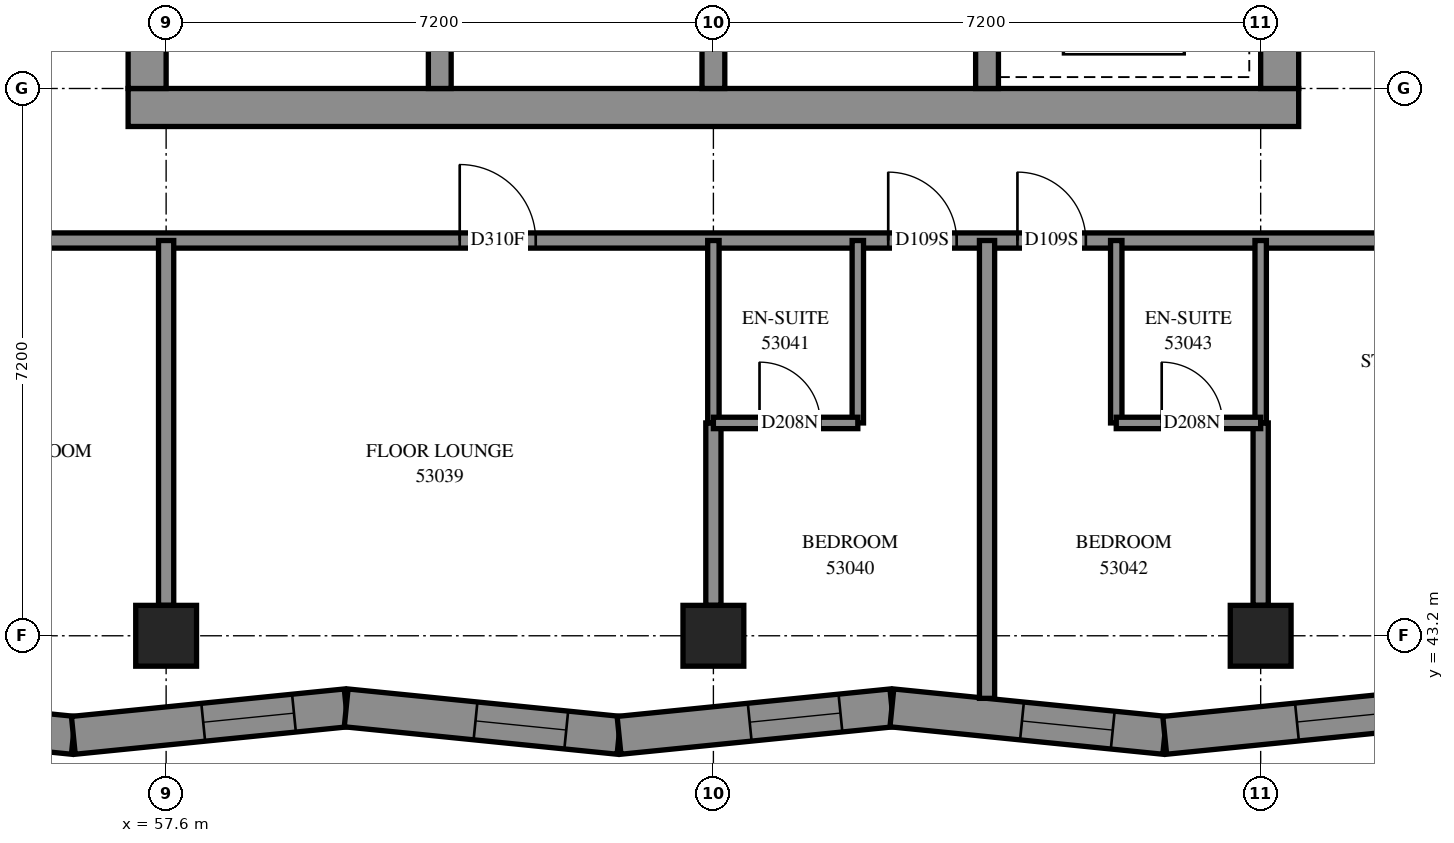
"""IFC4 building model, lengths in metres.
Left out: names, types, materials, properties, quantities, classifications, styles, units other than length and angle.
Written with IfcOpenShell. Run it as: python <this file> out.ifc"""

import sys

from ifc_helpers import new_model, si_unit, direction, frame, frame_2d, origin, origin_2d, place, context, subcontext, project, spatial, polyline, rectangle, outline, extrude, element, fill, save


model = new_model("IFC4")
c1 = context("Model", 3, precision=1e-05, world=origin(), true_north=direction((0.0, 1.0)))
c2 = subcontext(c1, "Body", "Model", "MODEL_VIEW")
j1 = project(units=[si_unit("LENGTHUNIT", "METRE"), si_unit("PLANEANGLEUNIT", "RADIAN")], contexts=[c1])
p1 = place(None, origin())
s1 = spatial("IfcSite", under=j1, at=p1, CompositionType="ELEMENT")
p2 = place(p1, origin())
s2 = spatial("IfcBuilding", under=s1, at=p2, CompositionType="ELEMENT")
p3 = place(p2, frame((0.0, 0.0, 196.4)))
s3 = spatial("IfcBuildingStorey", under=s2, at=p3, CompositionType="ELEMENT", Elevation=196.4)
for number, where, z_axis, x_axis in (
    (1, (57.6, 43.2, 0.0), (0.0, 0.0, 1.0), (1.0, 0.0, 0.0)),
    (2, (64.8, 43.2, 0.0), (0.0, 0.0, 1.0), (1.0, 0.0, 0.0)),
    (3, (72.0, 43.2, 0.0), (0.0, 0.0, 1.0), (1.0, 0.0, 0.0)),
):
    element("IfcColumn", number, at=place(p3, frame(where, z_axis=z_axis, x_axis=x_axis)), inside=s3, PredefinedType="COLUMN", context=c2, shape_type="SweptSolid", body=[
        extrude(rectangle(XDim=0.8, YDim=0.8, at=origin_2d()), origin(), (0.0, 0.0, 1.0), 3.1),
    ])
p4 = place(p3, frame((57.1, 50.15, -0.3), z_axis=(0.0, 0.0, 1.0), x_axis=(1.0, 0.0, 0.0)))
e4 = element("IfcWall", 4, at=p4, inside=s3, PredefinedType="SHEAR", context=c2, shape_type="SweptSolid", body=[
    extrude(rectangle(XDim=15.4, YDim=0.5, at=frame_2d((7.7, 0.0))), origin(), (0.0, 0.0, 1.0), 2.7),
])
p5 = place(p3, frame((57.35, 50.4, -0.3), z_axis=(0.0, 0.0, 1.0), x_axis=(0.0, 1.0, 0.0)))
e5 = element("IfcWall", 5, at=p5, inside=s3, PredefinedType="SHEAR", context=c2, shape_type="SweptSolid", body=[
    extrude(rectangle(XDim=14.4, YDim=0.5, at=frame_2d((7.2, 0.0))), origin(), (0.0, 0.0, 1.0), 2.7),
])
p6 = place(p5, frame((4.55, 0.0, 0.3)))
e6 = element("IfcOpeningElement", 6, at=p6, cuts=e5, PredefinedType="OPENING", context=c2, shape_type="SweptSolid", body=[
    extrude(rectangle(XDim=1.1, YDim=2.1, at=frame_2d((0.55, 1.05))), frame((0.0, 0.26, 0.0), z_axis=(0.0, -1.0, 0.0), x_axis=(1.0, 0.0, 0.0)), (0.0, 0.0, 1.0), 0.52),
])
p7 = place(p5, frame((11.35, 0.0, 0.3)))
e7 = element("IfcOpeningElement", 7, at=p7, cuts=e5, PredefinedType="OPENING", context=c2, shape_type="SweptSolid", body=[
    extrude(rectangle(XDim=1.1, YDim=2.1, at=frame_2d((0.55, 1.05))), frame((0.0, 0.26, 0.0), z_axis=(0.0, -1.0, 0.0), x_axis=(1.0, 0.0, 0.0)), (0.0, 0.0, 1.0), 0.52),
])
p8 = place(p3, frame((72.25, 50.4, -0.3), z_axis=(0.0, 0.0, 1.0), x_axis=(0.0, 1.0, 0.0)))
e8 = element("IfcWall", 8, at=p8, inside=s3, PredefinedType="SHEAR", context=c2, shape_type="SweptSolid", body=[
    extrude(rectangle(XDim=14.4, YDim=0.5, at=frame_2d((7.2, 0.0))), origin(), (0.0, 0.0, 1.0), 2.7),
])
p9 = place(p8, frame((4.55, 0.0, 0.3)))
e9 = element("IfcOpeningElement", 9, at=p9, cuts=e8, PredefinedType="OPENING", context=c2, shape_type="SweptSolid", body=[
    extrude(rectangle(XDim=1.1, YDim=2.1, at=frame_2d((0.55, 1.05))), frame((0.0, 0.26, 0.0), z_axis=(0.0, -1.0, 0.0), x_axis=(1.0, 0.0, 0.0)), (0.0, 0.0, 1.0), 0.52),
])
p10 = place(p8, frame((11.35, 0.0, 0.3)))
e10 = element("IfcOpeningElement", 10, at=p10, cuts=e8, PredefinedType="OPENING", context=c2, shape_type="SweptSolid", body=[
    extrude(rectangle(XDim=1.1, YDim=2.1, at=frame_2d((0.55, 1.05))), frame((0.0, 0.26, 0.0), z_axis=(0.0, -1.0, 0.0), x_axis=(1.0, 0.0, 0.0)), (0.0, 0.0, 1.0), 0.52),
])
for number, where, z_axis, x_axis in (
    (11, (61.2, 50.4, 0.0), (0.0, 0.0, 1.0), (0.0, 1.0, 0.0)),
    (12, (64.8, 50.4, 0.0), (0.0, 0.0, 1.0), (0.0, 1.0, 0.0)),
    (13, (68.4, 50.4, 0.0), (0.0, 0.0, 1.0), (0.0, 1.0, 0.0)),
):
    element("IfcWall", number, at=place(p3, frame(where, z_axis=z_axis, x_axis=x_axis)), inside=s3, PredefinedType="SOLIDWALL", context=c2, shape_type="SweptSolid", body=[
        extrude(rectangle(XDim=3.3, YDim=0.3, at=frame_2d((1.65, 0.0))), origin(), (0.0, 0.0, 1.0), 3.1),
    ])
p11 = place(p3, frame((52.769, 42.253, 0.0), z_axis=(0.0, 0.0, 1.0), x_axis=(0.9949827385, -0.1000467394, 0.0)))
e14 = element("IfcWall", 14, at=p11, inside=s3, PredefinedType="SOLIDWALL", context=c2, shape_type="SweptSolid", body=[
    extrude(outline(polyline([(0.046, -0.25), (3.653, -0.25), (3.603, 0.25), (-0.046, 0.25), (0.046, -0.25)])), origin(), (0.0, 0.0, 1.0), 3.1),
])
p12 = place(p11, frame((1.72, 0.0, 0.45)))
e15 = element("IfcOpeningElement", 15, at=p12, cuts=e14, PredefinedType="OPENING", context=c2, shape_type="SweptSolid", body=[
    extrude(rectangle(XDim=1.2, YDim=2.5, at=frame_2d((0.6, 1.25))), frame((0.0, 0.26, 0.0), z_axis=(0.0, -1.0, 0.0), x_axis=(1.0, 0.0, 0.0)), (0.0, 0.0, 1.0), 0.52),
])
p13 = place(p3, frame((56.379, 41.89, 0.0), z_axis=(0.0, 0.0, 1.0), x_axis=(0.994981047, 0.1000635608, 0.0)))
e16 = element("IfcWall", 16, at=p13, inside=s3, PredefinedType="SOLIDWALL", context=c2, shape_type="SweptSolid", body=[
    extrude(outline(polyline([(-0.025, -0.25), (3.583, -0.25), (3.633, 0.25), (0.025, 0.25), (-0.025, -0.25)])), origin(), (0.0, 0.0, 1.0), 3.1),
])
p14 = place(p13, frame((1.717, 0.0, 0.45)))
e17 = element("IfcOpeningElement", 17, at=p14, cuts=e16, PredefinedType="OPENING", context=c2, shape_type="SweptSolid", body=[
    extrude(rectangle(XDim=1.2, YDim=2.5, at=frame_2d((0.6, 1.25))), frame((0.0, 0.26, 0.0), z_axis=(0.0, -1.0, 0.0), x_axis=(1.0, 0.0, 0.0)), (0.0, 0.0, 1.0), 0.52),
])
p15 = place(p3, frame((59.969, 42.251, 0.0), z_axis=(0.0, 0.0, 1.0), x_axis=(0.9949813245, -0.1000608012, 0.0)))
e18 = element("IfcWall", 18, at=p15, inside=s3, PredefinedType="SOLIDWALL", context=c2, shape_type="SweptSolid", body=[
    extrude(outline(polyline([(0.025, -0.25), (3.633, -0.25), (3.583, 0.25), (-0.025, 0.25), (0.025, -0.25)])), origin(), (0.0, 0.0, 1.0), 3.1),
])
p16 = place(p15, frame((1.71, 0.0, 0.45)))
e19 = element("IfcOpeningElement", 19, at=p16, cuts=e18, PredefinedType="OPENING", context=c2, shape_type="SweptSolid", body=[
    extrude(rectangle(XDim=1.2, YDim=2.5, at=frame_2d((0.6, 1.25))), frame((0.0, 0.26, 0.0), z_axis=(0.0, -1.0, 0.0), x_axis=(1.0, 0.0, 0.0)), (0.0, 0.0, 1.0), 0.52),
])
p17 = place(p3, frame((63.559, 41.89, 0.0), z_axis=(0.0, 0.0, 1.0), x_axis=(0.994981047, 0.1000635608, 0.0)))
e20 = element("IfcWall", 20, at=p17, inside=s3, PredefinedType="SOLIDWALL", context=c2, shape_type="SweptSolid", body=[
    extrude(outline(polyline([(-0.025, -0.25), (3.583, -0.25), (3.633, 0.25), (0.025, 0.25), (-0.025, -0.25)])), origin(), (0.0, 0.0, 1.0), 3.1),
])
p18 = place(p17, frame((1.728, 0.0, 0.45)))
e21 = element("IfcOpeningElement", 21, at=p18, cuts=e20, PredefinedType="OPENING", context=c2, shape_type="SweptSolid", body=[
    extrude(rectangle(XDim=1.2, YDim=2.5, at=frame_2d((0.6, 1.25))), frame((0.0, 0.26, 0.0), z_axis=(0.0, -1.0, 0.0), x_axis=(1.0, 0.0, 0.0)), (0.0, 0.0, 1.0), 0.52),
])
p19 = place(p3, frame((67.148, 42.251, 0.0), z_axis=(0.0, 0.0, 1.0), x_axis=(0.994981047, -0.1000635608, 0.0)))
e22 = element("IfcWall", 22, at=p19, inside=s3, PredefinedType="SOLIDWALL", context=c2, shape_type="SweptSolid", body=[
    extrude(outline(polyline([(0.025, -0.25), (3.633, -0.25), (3.583, 0.25), (-0.025, 0.25), (0.025, -0.25)])), origin(), (0.0, 0.0, 1.0), 3.1),
])
p20 = place(p19, frame((1.72, 0.0, 0.45)))
e23 = element("IfcOpeningElement", 23, at=p20, cuts=e22, PredefinedType="OPENING", context=c2, shape_type="SweptSolid", body=[
    extrude(rectangle(XDim=1.2, YDim=2.5, at=frame_2d((0.6, 1.25))), frame((0.0, 0.26, 0.0), z_axis=(0.0, -1.0, 0.0), x_axis=(1.0, 0.0, 0.0)), (0.0, 0.0, 1.0), 0.52),
])
p21 = place(p3, frame((70.738, 41.89, 0.0), z_axis=(0.0, 0.0, 1.0), x_axis=(0.9949827385, 0.1000467394, 0.0)))
e24 = element("IfcWall", 24, at=p21, inside=s3, PredefinedType="SOLIDWALL", context=c2, shape_type="SweptSolid", body=[
    extrude(outline(polyline([(-0.025, -0.25), (3.583, -0.25), (3.674, 0.25), (0.025, 0.25), (-0.025, -0.25)])), origin(), (0.0, 0.0, 1.0), 3.1),
])
p22 = place(p21, frame((1.748, 0.0, 0.45)))
e25 = element("IfcOpeningElement", 25, at=p22, cuts=e24, PredefinedType="OPENING", context=c2, shape_type="SweptSolid", body=[
    extrude(rectangle(XDim=1.2, YDim=2.5, at=frame_2d((0.6, 1.25))), frame((0.0, 0.26, 0.0), z_axis=(0.0, -1.0, 0.0), x_axis=(1.0, 0.0, 0.0)), (0.0, 0.0, 1.0), 0.52),
])
p23 = place(p3, frame((55.6, 48.4, 0.0), z_axis=(0.0, 0.0, 1.0), x_axis=(1.0, 0.0, 0.0)))
e26 = element("IfcWall", 26, at=p23, inside=s3, PredefinedType="PARTITIONING", context=c2, shape_type="SweptSolid", body=[
    extrude(rectangle(XDim=18.4, YDim=0.2, at=frame_2d((9.2, 0.0))), origin(), (0.0, 0.0, 1.0), 3.1),
])
p24 = place(p23, frame((5.862, 0.0, 0.0)))
e27 = element("IfcOpeningElement", 27, at=p24, cuts=e26, PredefinedType="OPENING", context=c2, shape_type="SweptSolid", body=[
    extrude(rectangle(XDim=1.0, YDim=2.1, at=frame_2d((0.5, 1.05))), frame((0.0, 0.11, 0.0), z_axis=(0.0, -1.0, 0.0), x_axis=(1.0, 0.0, 0.0)), (0.0, 0.0, 1.0), 0.22),
])
p25 = place(p23, frame((11.5, 0.0, 0.0)))
e28 = element("IfcOpeningElement", 28, at=p25, cuts=e26, PredefinedType="OPENING", context=c2, shape_type="SweptSolid", body=[
    extrude(rectangle(XDim=0.9, YDim=2.1, at=frame_2d((0.45, 1.05))), frame((0.0, 0.11, 0.0), z_axis=(0.0, -1.0, 0.0), x_axis=(1.0, 0.0, 0.0)), (0.0, 0.0, 1.0), 0.22),
])
p26 = place(p23, frame((13.2, 0.0, 0.0)))
e29 = element("IfcOpeningElement", 29, at=p26, cuts=e26, PredefinedType="OPENING", context=c2, shape_type="SweptSolid", body=[
    extrude(rectangle(XDim=0.9, YDim=2.1, at=frame_2d((0.45, 1.05))), frame((0.0, 0.11, 0.0), z_axis=(0.0, -1.0, 0.0), x_axis=(1.0, 0.0, 0.0)), (0.0, 0.0, 1.0), 0.22),
])
p27 = place(p3, frame((68.4, 42.377, 0.0), z_axis=(0.0, 0.0, 1.0), x_axis=(0.0, 1.0, 0.0)))
e30 = element("IfcWall", 30, at=p27, inside=s3, PredefinedType="PARTITIONING", context=c2, shape_type="SweptSolid", body=[
    extrude(rectangle(XDim=6.023, YDim=0.2, at=frame_2d((3.012, 0.0))), origin(), (0.0, 0.0, 1.0), 3.1),
])
p28 = place(p3, frame((57.6, 43.6, 0.0), z_axis=(0.0, 0.0, 1.0), x_axis=(0.0, 1.0, 0.0)))
e31 = element("IfcWall", 31, at=p28, inside=s3, PredefinedType="PARTITIONING", context=c2, shape_type="SweptSolid", body=[
    extrude(rectangle(XDim=4.8, YDim=0.2, at=frame_2d((2.4, 0.0))), origin(), (0.0, 0.0, 1.0), 3.1),
])
p29 = place(p3, frame((64.8, 43.6, 0.0), z_axis=(0.0, 0.0, 1.0), x_axis=(0.0, 1.0, 0.0)))
e32 = element("IfcWall", 32, at=p29, inside=s3, PredefinedType="PARTITIONING", context=c2, shape_type="SweptSolid", body=[
    extrude(rectangle(XDim=2.4, YDim=0.2, at=frame_2d((1.2, 0.0))), origin(), (0.0, 0.0, 1.0), 3.1),
])
for number, where, z_axis, x_axis in (
    (33, (66.7, 46.0, 0.0), (0.0, 0.0, 1.0), (0.0, 1.0, 0.0)),
    (34, (64.8, 46.0, 0.0), (0.0, 0.0, 1.0), (0.0, 1.0, 0.0)),
    (35, (70.1, 46.0, 0.0), (0.0, 0.0, 1.0), (0.0, 1.0, 0.0)),
):
    element("IfcWall", number, at=place(p3, frame(where, z_axis=z_axis, x_axis=x_axis)), inside=s3, PredefinedType="PARTITIONING", context=c2, shape_type="SweptSolid", body=[
        extrude(rectangle(XDim=2.4, YDim=0.15, at=frame_2d((1.2, 0.0))), origin(), (0.0, 0.0, 1.0), 3.1),
    ])
p30 = place(p3, frame((72.0, 43.6, 0.0), z_axis=(0.0, 0.0, 1.0), x_axis=(0.0, 1.0, 0.0)))
e36 = element("IfcWall", 36, at=p30, inside=s3, PredefinedType="PARTITIONING", context=c2, shape_type="SweptSolid", body=[
    extrude(rectangle(XDim=2.4, YDim=0.2, at=frame_2d((1.2, 0.0))), origin(), (0.0, 0.0, 1.0), 3.1),
])
p31 = place(p3, frame((72.0, 46.0, 0.0), z_axis=(0.0, 0.0, 1.0), x_axis=(0.0, 1.0, 0.0)))
e37 = element("IfcWall", 37, at=p31, inside=s3, PredefinedType="PARTITIONING", context=c2, shape_type="SweptSolid", body=[
    extrude(rectangle(XDim=2.4, YDim=0.15, at=frame_2d((1.2, 0.0))), origin(), (0.0, 0.0, 1.0), 3.1),
])
p32 = place(p3, frame((64.8, 46.0, 0.0), z_axis=(0.0, 0.0, 1.0), x_axis=(1.0, 0.0, 0.0)))
e38 = element("IfcWall", 38, at=p32, inside=s3, PredefinedType="PARTITIONING", context=c2, shape_type="SweptSolid", body=[
    extrude(rectangle(XDim=1.9, YDim=0.15, at=frame_2d((0.95, 0.0))), origin(), (0.0, 0.0, 1.0), 3.1),
])
p33 = place(p32, frame((0.607, 0.0, 0.0)))
e39 = element("IfcOpeningElement", 39, at=p33, cuts=e38, PredefinedType="OPENING", context=c2, shape_type="SweptSolid", body=[
    extrude(rectangle(XDim=0.8, YDim=2.1, at=frame_2d((0.4, 1.05))), frame((0.0, 0.085, 0.0), z_axis=(0.0, -1.0, 0.0), x_axis=(1.0, 0.0, 0.0)), (0.0, 0.0, 1.0), 0.17),
])
p34 = place(p3, frame((70.1, 46.0, 0.0), z_axis=(0.0, 0.0, 1.0), x_axis=(1.0, 0.0, 0.0)))
e40 = element("IfcWall", 40, at=p34, inside=s3, PredefinedType="PARTITIONING", context=c2, shape_type="SweptSolid", body=[
    extrude(rectangle(XDim=1.9, YDim=0.15, at=frame_2d((0.95, 0.0))), origin(), (0.0, 0.0, 1.0), 3.1),
])
p35 = place(p34, frame((0.598, 0.0, 0.0)))
e41 = element("IfcOpeningElement", 41, at=p35, cuts=e40, PredefinedType="OPENING", context=c2, shape_type="SweptSolid", body=[
    extrude(rectangle(XDim=0.8, YDim=2.1, at=frame_2d((0.4, 1.05))), frame((0.0, 0.085, 0.0), z_axis=(0.0, -1.0, 0.0), x_axis=(1.0, 0.0, 0.0)), (0.0, 0.0, 1.0), 0.17),
])
p36 = place(p14, origin())
e42 = element("IfcWindow", 42, at=p36, inside=s3, PartitioningType="SINGLE_PANEL", PredefinedType="WINDOW", context=c2, shape_type="SweptSolid", body=[
    extrude(rectangle(XDim=1.2, YDim=2.5, at=frame_2d((0.6, 1.25))), frame((0.0, 0.18, 0.0), z_axis=(0.0, -1.0, 0.0), x_axis=(1.0, 0.0, 0.0)), (0.0, 0.0, 1.0), 0.06),
])
fill(e17, e42)
p37 = place(p16, origin())
e43 = element("IfcWindow", 43, at=p37, inside=s3, PartitioningType="SINGLE_PANEL", PredefinedType="WINDOW", context=c2, shape_type="SweptSolid", body=[
    extrude(rectangle(XDim=1.2, YDim=2.5, at=frame_2d((0.6, 1.25))), frame((0.0, 0.18, 0.0), z_axis=(0.0, -1.0, 0.0), x_axis=(1.0, 0.0, 0.0)), (0.0, 0.0, 1.0), 0.06),
])
fill(e19, e43)
p38 = place(p18, origin())
e44 = element("IfcWindow", 44, at=p38, inside=s3, PartitioningType="SINGLE_PANEL", PredefinedType="WINDOW", context=c2, shape_type="SweptSolid", body=[
    extrude(rectangle(XDim=1.2, YDim=2.5, at=frame_2d((0.6, 1.25))), frame((0.0, 0.18, 0.0), z_axis=(0.0, -1.0, 0.0), x_axis=(1.0, 0.0, 0.0)), (0.0, 0.0, 1.0), 0.06),
])
fill(e21, e44)
p39 = place(p20, origin())
e45 = element("IfcWindow", 45, at=p39, inside=s3, PartitioningType="SINGLE_PANEL", PredefinedType="WINDOW", context=c2, shape_type="SweptSolid", body=[
    extrude(rectangle(XDim=1.2, YDim=2.5, at=frame_2d((0.6, 1.25))), frame((0.0, 0.18, 0.0), z_axis=(0.0, -1.0, 0.0), x_axis=(1.0, 0.0, 0.0)), (0.0, 0.0, 1.0), 0.06),
])
fill(e23, e45)
p40 = place(p22, origin())
e46 = element("IfcWindow", 46, at=p40, inside=s3, PartitioningType="SINGLE_PANEL", PredefinedType="WINDOW", context=c2, shape_type="SweptSolid", body=[
    extrude(rectangle(XDim=1.2, YDim=2.5, at=frame_2d((0.6, 1.25))), frame((0.0, 0.18, 0.0), z_axis=(0.0, -1.0, 0.0), x_axis=(1.0, 0.0, 0.0)), (0.0, 0.0, 1.0), 0.06),
])
fill(e25, e46)
p41 = place(p24, origin())
e47 = element("IfcDoor", 47, at=p41, inside=s3, OperationType="SINGLE_SWING_LEFT", PredefinedType="DOOR", context=c2, shape_type="SweptSolid", body=[
    extrude(rectangle(XDim=1.0, YDim=2.1, at=frame_2d((0.5, 1.05))), frame((0.0, 0.025, 0.0), z_axis=(0.0, -1.0, 0.0), x_axis=(1.0, 0.0, 0.0)), (0.0, 0.0, 1.0), 0.05),
])
fill(e27, e47)
p42 = place(p25, origin())
e48 = element("IfcDoor", 48, at=p42, inside=s3, OperationType="SINGLE_SWING_LEFT", PredefinedType="DOOR", context=c2, shape_type="SweptSolid", body=[
    extrude(rectangle(XDim=0.9, YDim=2.1, at=frame_2d((0.45, 1.05))), frame((0.0, 0.025, 0.0), z_axis=(0.0, -1.0, 0.0), x_axis=(1.0, 0.0, 0.0)), (0.0, 0.0, 1.0), 0.05),
])
fill(e28, e48)
p43 = place(p33, origin())
e49 = element("IfcDoor", 49, at=p43, inside=s3, OperationType="SINGLE_SWING_RIGHT", PredefinedType="DOOR", context=c2, shape_type="SweptSolid", body=[
    extrude(rectangle(XDim=0.8, YDim=2.1, at=frame_2d((0.4, 1.05))), frame((0.0, 0.025, 0.0), z_axis=(0.0, -1.0, 0.0), x_axis=(1.0, 0.0, 0.0)), (0.0, 0.0, 1.0), 0.05),
])
fill(e39, e49)
p44 = place(p26, origin())
e50 = element("IfcDoor", 50, at=p44, inside=s3, OperationType="SINGLE_SWING_RIGHT", PredefinedType="DOOR", context=c2, shape_type="SweptSolid", body=[
    extrude(rectangle(XDim=0.9, YDim=2.1, at=frame_2d((0.45, 1.05))), frame((0.0, 0.025, 0.0), z_axis=(0.0, -1.0, 0.0), x_axis=(1.0, 0.0, 0.0)), (0.0, 0.0, 1.0), 0.05),
])
fill(e29, e50)
p45 = place(p35, origin())
e51 = element("IfcDoor", 51, at=p45, inside=s3, OperationType="SINGLE_SWING_RIGHT", PredefinedType="DOOR", context=c2, shape_type="SweptSolid", body=[
    extrude(rectangle(XDim=0.8, YDim=2.1, at=frame_2d((0.4, 1.05))), frame((0.0, 0.025, 0.0), z_axis=(0.0, -1.0, 0.0), x_axis=(1.0, 0.0, 0.0)), (0.0, 0.0, 1.0), 0.05),
])
fill(e41, e51)
save(model, sys.argv[1])
